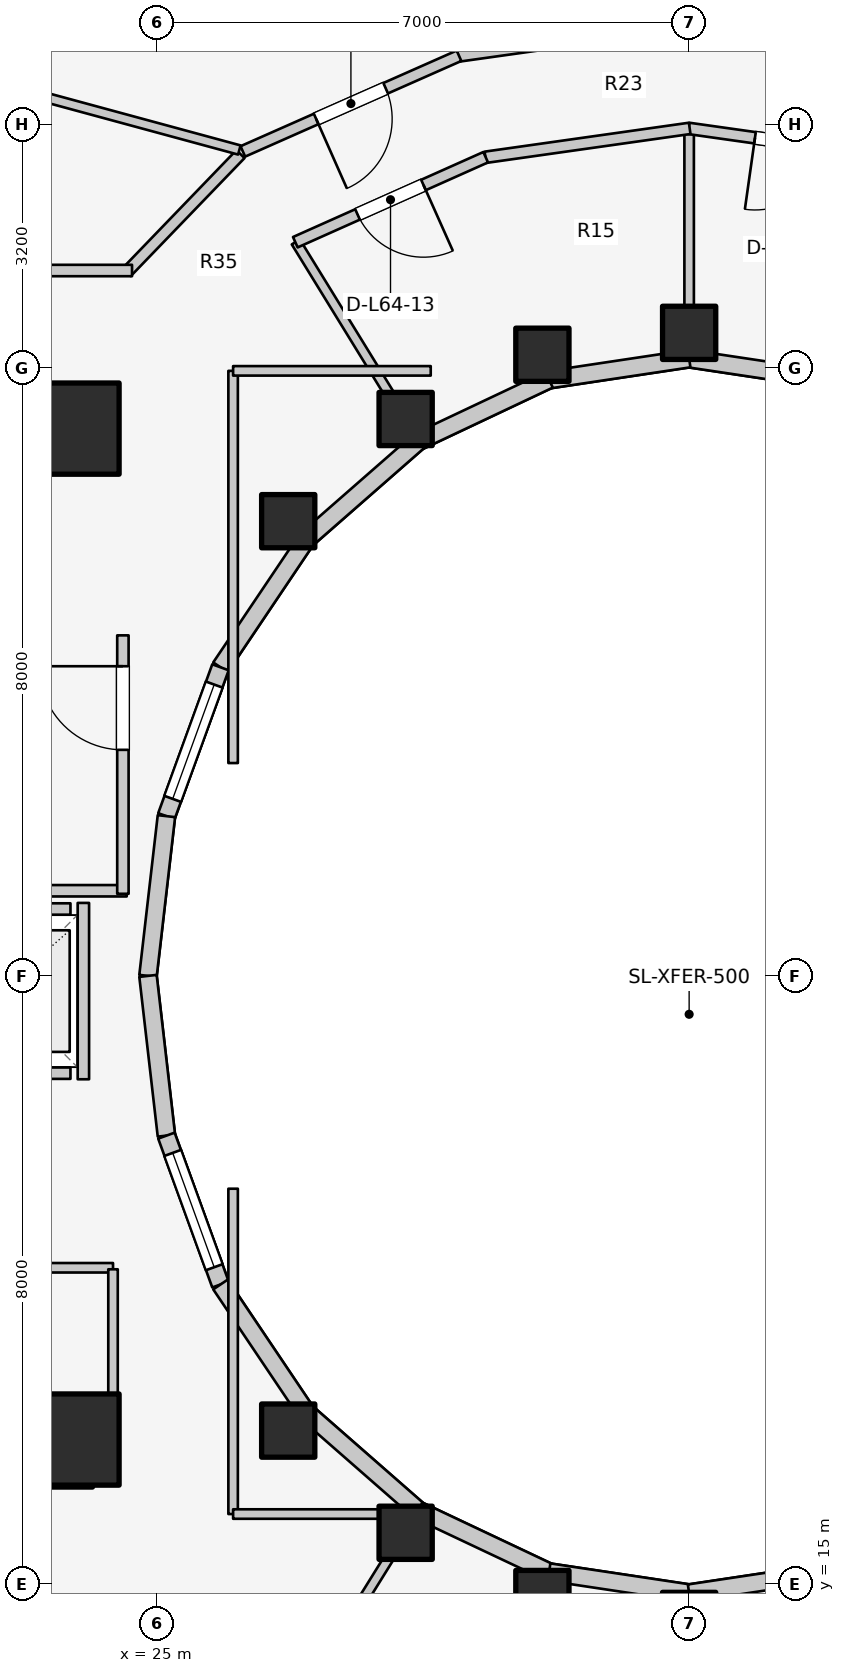
"""IFC4 building model, lengths in metres.
Left out: names, types, materials, properties, quantities, classifications, styles, units other than length and angle.
Written with IfcOpenShell. Run it as: python <this file> out.ifc"""

import sys

from ifc_helpers import new_model, si_unit, direction, frame, frame_2d, origin, origin_2d, place, context, subcontext, project, spatial, rectangle, extrude, element, fill, save


model = new_model("IFC4")
c1 = context("Model", 3, precision=1e-05, world=origin(), true_north=direction((0.0, 1.0)))
c2 = subcontext(c1, "Body", "Model", "MODEL_VIEW")
j1 = project(units=[si_unit("LENGTHUNIT", "METRE"), si_unit("PLANEANGLEUNIT", "RADIAN")], contexts=[c1])
p1 = place(None, origin())
s1 = spatial("IfcSite", under=j1, at=p1, CompositionType="ELEMENT")
p2 = place(p1, origin())
s2 = spatial("IfcBuilding", under=s1, at=p2, CompositionType="ELEMENT")
p3 = place(p2, frame((0.0, 0.0, 210.9)))
s3 = spatial("IfcBuildingStorey", under=s2, at=p3, CompositionType="ELEMENT", Elevation=210.9)
for number, where, z_axis, x_axis in (
    (1, (19.65, 16.55, 0.0), (0.0, 0.0, 1.0), (1.0, 0.0, 0.0)),
    (2, (19.65, 30.35, 0.0), (0.0, 0.0, 1.0), (1.0, 0.0, 0.0)),
):
    element("IfcWall", number, at=place(p3, frame(where, z_axis=z_axis, x_axis=x_axis)), inside=s3, PredefinedType="SHEAR", context=c2, shape_type="SweptSolid", body=[
        extrude(rectangle(XDim=4.5, YDim=0.55, at=frame_2d((2.25, 0.0))), origin(), (0.0, 0.0, 1.0), 3.1),
    ])
for number, where, z_axis, x_axis in (
    (3, (23.9, 16.9, 0.0), (0.0, 0.0, 1.0), (1.0, 0.0, 0.0)),
    (4, (23.9, 30.2, 0.0), (0.0, 0.0, 1.0), (1.0, 0.0, 0.0)),
):
    element("IfcColumn", number, at=place(p3, frame(where, z_axis=z_axis, x_axis=x_axis)), inside=s3, PredefinedType="COLUMN", context=c2, shape_type="SweptSolid", body=[
        extrude(rectangle(XDim=1.2, YDim=1.2, at=origin_2d()), origin(), (0.0, 0.0, 1.0), 3.1),
    ])
for number, where, z_axis, x_axis in (
    (5, (32.0, 31.46, 0.0), (0.0, 0.0, 1.0), (1.0, 0.0, 0.0)),
    (6, (30.069, 31.172, 0.0), (0.0, 0.0, 1.0), (1.0, 0.0, 0.0)),
    (7, (28.27, 30.327, 0.0), (0.0, 0.0, 1.0), (1.0, 0.0, 0.0)),
    (8, (26.725, 28.982, 0.0), (0.0, 0.0, 1.0), (1.0, 0.0, 0.0)),
    (9, (26.725, 17.018, 0.0), (0.0, 0.0, 1.0), (1.0, 0.0, 0.0)),
    (10, (28.27, 15.673, 0.0), (0.0, 0.0, 1.0), (1.0, 0.0, 0.0)),
    (11, (30.069, 14.828, 0.0), (0.0, 0.0, 1.0), (1.0, 0.0, 0.0)),
    (12, (32.0, 14.54, 0.0), (0.0, 0.0, 1.0), (1.0, 0.0, 0.0)),
):
    element("IfcColumn", number, at=place(p3, frame(where, z_axis=z_axis, x_axis=x_axis)), inside=s3, PredefinedType="COLUMN", context=c2, shape_type="SweptSolid", body=[
        extrude(rectangle(XDim=0.7, YDim=0.7, at=origin_2d()), origin(), (0.0, 0.0, 1.0), 3.1),
    ])
for number, where, z_axis, x_axis in (
    (13, (33.843, 30.843, 0.0), (0.0, 0.0, 1.0), (-0.989, 0.149, 0.0)),
    (14, (32.0, 31.12, 0.0), (0.0, 0.0, 1.0), (-0.989, -0.149, 0.0)),
):
    element("IfcWall", number, at=place(p3, frame(where, z_axis=z_axis, x_axis=x_axis)), inside=s3, PredefinedType="STANDARD", context=c2, shape_type="SweptSolid", body=[
        extrude(rectangle(XDim=1.864, YDim=0.23, at=frame_2d((0.932, 0.0))), origin(), (0.0, 0.0, 1.0), 2.16),
    ])
p4 = place(p3, frame((30.157, 30.843, 0.0), z_axis=(0.0, 0.0, 1.0), x_axis=(-0.904179699603, -0.427152280606, 0.0)))
e15 = element("IfcWall", 15, at=p4, inside=s3, PredefinedType="STANDARD", context=c2, shape_type="SweptSolid", body=[
    extrude(rectangle(XDim=1.899, YDim=0.23, at=frame_2d((0.95, 0.0))), origin(), (0.0, 0.0, 1.0), 2.16),
])
p5 = place(p3, frame((28.44, 30.032, 0.0), z_axis=(0.0, 0.0, 1.0), x_axis=(-0.752576694707, -0.658504607869, 0.0)))
e16 = element("IfcWall", 16, at=p5, inside=s3, PredefinedType="STANDARD", context=c2, shape_type="SweptSolid", body=[
    extrude(rectangle(XDim=1.959, YDim=0.23, at=frame_2d((0.98, 0.0))), origin(), (0.0, 0.0, 1.0), 2.16),
])
p6 = place(p3, frame((26.965, 28.742, 0.0), z_axis=(0.0, 0.0, 1.0), x_axis=(-0.558197800898, -0.829707909492, 0.0)))
e17 = element("IfcWall", 17, at=p6, inside=s3, PredefinedType="STANDARD", context=c2, shape_type="SweptSolid", body=[
    extrude(rectangle(XDim=2.027, YDim=0.23, at=frame_2d((1.013, 0.0))), origin(), (0.0, 0.0, 1.0), 2.16),
])
p7 = place(p3, frame((25.834, 27.06, 0.0), z_axis=(0.0, 0.0, 1.0), x_axis=(-0.341423187295, -0.93990968033, 0.0)))
e18 = element("IfcWall", 18, at=p7, inside=s3, PredefinedType="STANDARD", context=c2, shape_type="SweptSolid", body=[
    extrude(rectangle(XDim=2.084, YDim=0.23, at=frame_2d((1.042, 0.0))), origin(), (0.0, 0.0, 1.0), 2.84),
])
p8 = place(p7, frame((0.242, 0.0, 0.85)))
e19 = element("IfcOpeningElement", 19, at=p8, cuts=e18, PredefinedType="OPENING", context=c2, shape_type="SweptSolid", body=[
    extrude(rectangle(XDim=1.6, YDim=1.65, at=frame_2d((0.8, 0.825))), frame((0.0, 0.125, 0.0), z_axis=(0.0, -1.0, 0.0), x_axis=(1.0, 0.0, 0.0)), (0.0, 0.0, 1.0), 0.25),
])
for number, where, z_axis, x_axis in (
    (20, (25.123, 25.102, 0.0), (0.0, 0.0, 1.0), (-0.115, -0.993, 0.0)),
    (21, (24.88, 23.0, 0.0), (0.0, 0.0, 1.0), (0.115, -0.993, 0.0)),
):
    element("IfcWall", number, at=place(p3, frame(where, z_axis=z_axis, x_axis=x_axis)), inside=s3, PredefinedType="STANDARD", context=c2, shape_type="SweptSolid", body=[
        extrude(rectangle(XDim=2.115, YDim=0.23, at=frame_2d((1.058, 0.0))), origin(), (0.0, 0.0, 1.0), 2.84),
    ])
p9 = place(p3, frame((25.123, 20.898, 0.0), z_axis=(0.0, 0.0, 1.0), x_axis=(0.341423187295, -0.93990968033, 0.0)))
e22 = element("IfcWall", 22, at=p9, inside=s3, PredefinedType="STANDARD", context=c2, shape_type="SweptSolid", body=[
    extrude(rectangle(XDim=2.084, YDim=0.23, at=frame_2d((1.042, 0.0))), origin(), (0.0, 0.0, 1.0), 2.84),
])
p10 = place(p9, frame((0.242, 0.0, 0.85)))
e23 = element("IfcOpeningElement", 23, at=p10, cuts=e22, PredefinedType="OPENING", context=c2, shape_type="SweptSolid", body=[
    extrude(rectangle(XDim=1.6, YDim=1.65, at=frame_2d((0.8, 0.825))), frame((0.0, 0.125, 0.0), z_axis=(0.0, -1.0, 0.0), x_axis=(1.0, 0.0, 0.0)), (0.0, 0.0, 1.0), 0.25),
])
p11 = place(p3, frame((25.834, 18.94, 0.0), z_axis=(0.0, 0.0, 1.0), x_axis=(0.558197800898, -0.829707909492, 0.0)))
e24 = element("IfcWall", 24, at=p11, inside=s3, PredefinedType="STANDARD", context=c2, shape_type="SweptSolid", body=[
    extrude(rectangle(XDim=2.027, YDim=0.23, at=frame_2d((1.013, 0.0))), origin(), (0.0, 0.0, 1.0), 2.16),
])
p12 = place(p3, frame((26.965, 17.258, 0.0), z_axis=(0.0, 0.0, 1.0), x_axis=(0.752576694707, -0.658504607869, 0.0)))
e25 = element("IfcWall", 25, at=p12, inside=s3, PredefinedType="STANDARD", context=c2, shape_type="SweptSolid", body=[
    extrude(rectangle(XDim=1.959, YDim=0.23, at=frame_2d((0.98, 0.0))), origin(), (0.0, 0.0, 1.0), 2.16),
])
p13 = place(p3, frame((28.44, 15.968, 0.0), z_axis=(0.0, 0.0, 1.0), x_axis=(0.904179699603, -0.427152280606, 0.0)))
e26 = element("IfcWall", 26, at=p13, inside=s3, PredefinedType="STANDARD", context=c2, shape_type="SweptSolid", body=[
    extrude(rectangle(XDim=1.899, YDim=0.23, at=frame_2d((0.95, 0.0))), origin(), (0.0, 0.0, 1.0), 2.16),
])
for number, where, z_axis, x_axis in (
    (27, (30.157, 15.157, 0.0), (0.0, 0.0, 1.0), (0.989, -0.149, 0.0)),
    (28, (32.0, 14.88, 0.0), (0.0, 0.0, 1.0), (0.989, 0.149, 0.0)),
):
    element("IfcWall", number, at=place(p3, frame(where, z_axis=z_axis, x_axis=x_axis)), inside=s3, PredefinedType="STANDARD", context=c2, shape_type="SweptSolid", body=[
        extrude(rectangle(XDim=1.864, YDim=0.23, at=frame_2d((0.932, 0.0))), origin(), (0.0, 0.0, 1.0), 2.16),
    ])
p14 = place(p3, frame((22.04, 21.72, 0.0), z_axis=(0.0, 0.0, 1.0), x_axis=(1.0, 0.0, 0.0)))
e29 = element("IfcWall", 29, at=p14, inside=s3, PredefinedType="SOLIDWALL", context=c2, shape_type="SweptSolid", body=[
    extrude(rectangle(XDim=1.82, YDim=0.15, at=frame_2d((0.91, 0.0))), origin(), (0.0, 0.0, 1.0), 2.12),
])
p15 = place(p14, frame((0.36, 0.0, 0.0)))
e30 = element("IfcOpeningElement", 30, at=p15, cuts=e29, PredefinedType="OPENING", context=c2, shape_type="SweptSolid", body=[
    extrude(rectangle(XDim=1.1, YDim=2.1, at=frame_2d((0.55, 1.05))), frame((0.0, 0.085, 0.0), z_axis=(0.0, -1.0, 0.0), x_axis=(1.0, 0.0, 0.0)), (0.0, 0.0, 1.0), 0.17),
])
p16 = place(p3, frame((22.04, 23.88, 0.0), z_axis=(0.0, 0.0, 1.0), x_axis=(1.0, 0.0, 0.0)))
e31 = element("IfcWall", 31, at=p16, inside=s3, PredefinedType="SOLIDWALL", context=c2, shape_type="SweptSolid", body=[
    extrude(rectangle(XDim=1.82, YDim=0.15, at=frame_2d((0.91, 0.0))), origin(), (0.0, 0.0, 1.0), 2.12),
])
p17 = place(p3, frame((24.03, 21.64, 0.0), z_axis=(0.0, 0.0, 1.0), x_axis=(0.0, 1.0, 0.0)))
e32 = element("IfcWall", 32, at=p17, inside=s3, PredefinedType="SOLIDWALL", context=c2, shape_type="SweptSolid", body=[
    extrude(rectangle(XDim=2.32, YDim=0.15, at=frame_2d((1.16, 0.0))), origin(), (0.0, 0.0, 1.0), 2.12),
])
p18 = place(p3, frame((19.52, 24.12, 0.0), z_axis=(0.0, 0.0, 1.0), x_axis=(1.0, 0.0, 0.0)))
e33 = element("IfcWall", 33, at=p18, inside=s3, PredefinedType="PARTITIONING", context=c2, shape_type="SweptSolid", body=[
    extrude(rectangle(XDim=5.08, YDim=0.15, at=frame_2d((2.54, 0.0))), origin(), (0.0, 0.0, 1.0), 2.12),
])
p19 = place(p3, frame((24.55, 24.08, 0.0), z_axis=(0.0, 0.0, 1.0), x_axis=(0.0, 1.0, 0.0)))
e34 = element("IfcWall", 34, at=p19, inside=s3, PredefinedType="PARTITIONING", context=c2, shape_type="SweptSolid", body=[
    extrude(rectangle(XDim=3.4, YDim=0.15, at=frame_2d((1.7, 0.0))), origin(), (0.0, 0.0, 1.0), 2.855),
])
p20 = place(p19, frame((1.894, 0.0, 0.0)))
e35 = element("IfcOpeningElement", 35, at=p20, cuts=e34, PredefinedType="OPENING", context=c2, shape_type="SweptSolid", body=[
    extrude(rectangle(XDim=1.1, YDim=2.1, at=frame_2d((0.55, 1.05))), frame((0.0, 0.085, 0.0), z_axis=(0.0, -1.0, 0.0), x_axis=(1.0, 0.0, 0.0)), (0.0, 0.0, 1.0), 0.17),
])
p21 = place(p3, frame((19.55, 19.16, 0.0), z_axis=(0.0, 0.0, 1.0), x_axis=(1.0, 0.0, 0.0)))
e36 = element("IfcWall", 36, at=p21, inside=s3, PredefinedType="PARTITIONING", context=c2, shape_type="SweptSolid", body=[
    extrude(rectangle(XDim=4.87, YDim=0.125, at=frame_2d((2.435, 0.0))), origin(), (0.0, 0.0, 1.0), 2.12),
])
p22 = place(p21, frame((2.272, 0.0, 0.0)))
e37 = element("IfcOpeningElement", 37, at=p22, cuts=e36, PredefinedType="OPENING", context=c2, shape_type="SweptSolid", body=[
    extrude(rectangle(XDim=0.85, YDim=2.05, at=frame_2d((0.425, 1.025))), frame((0.0, 0.073, 0.0), z_axis=(0.0, -1.0, 0.0), x_axis=(1.0, 0.0, 0.0)), (0.0, 0.0, 1.0), 0.145),
])
p23 = place(p3, frame((24.42, 17.1, 0.0), z_axis=(0.0, 0.0, 1.0), x_axis=(0.0, 1.0, 0.0)))
e38 = element("IfcWall", 38, at=p23, inside=s3, PredefinedType="PARTITIONING", context=c2, shape_type="SweptSolid", body=[
    extrude(rectangle(XDim=2.04, YDim=0.125, at=frame_2d((1.02, 0.0))), origin(), (0.0, 0.0, 1.0), 2.232),
])
p24 = place(p3, frame((32.0, 31.1, 0.0), z_axis=(0.0, 0.0, 1.0), x_axis=(0.0, 1.0, 0.0)))
e39 = element("IfcWall", 39, at=p24, inside=s3, PredefinedType="PARTITIONING", context=c2, shape_type="SweptSolid", body=[
    extrude(rectangle(XDim=3.05, YDim=0.125, at=frame_2d((1.525, 0.0))), origin(), (0.0, 0.0, 1.0), 2.376),
])
p25 = place(p3, frame((28.45, 30.015, 0.0), z_axis=(0.0, 0.0, 1.0), x_axis=(-0.523992004803, 0.851723182086, 0.0)))
e40 = element("IfcWall", 40, at=p25, inside=s3, PredefinedType="PARTITIONING", context=c2, shape_type="SweptSolid", body=[
    extrude(rectangle(XDim=3.101, YDim=0.125, at=frame_2d((1.551, 0.0))), origin(), (0.0, 0.0, 1.0), 2.376),
])
p26 = place(p3, frame((34.68, 33.77, 0.0), z_axis=(0.0, 0.0, 1.0), x_axis=(-0.990132151456, 0.140136799779, 0.0)))
e41 = element("IfcWall", 41, at=p26, inside=s3, PredefinedType="PARTITIONING", context=c2, shape_type="SweptSolid", body=[
    extrude(rectangle(XDim=2.714, YDim=0.15, at=frame_2d((1.357, 0.0))), origin(), (0.0, 0.0, 1.0), 2.376),
])
p27 = place(p26, frame((0.882, 0.0, 0.0)))
e42 = element("IfcOpeningElement", 42, at=p27, cuts=e41, PredefinedType="OPENING", context=c2, shape_type="SweptSolid", body=[
    extrude(rectangle(XDim=0.95, YDim=2.1, at=frame_2d((0.475, 1.05))), frame((0.0, 0.085, 0.0), z_axis=(0.0, -1.0, 0.0), x_axis=(1.0, 0.0, 0.0)), (0.0, 0.0, 1.0), 0.17),
])
p28 = place(p3, frame((32.007, 34.15, 0.0), z_axis=(0.0, 0.0, 1.0), x_axis=(-0.990132151456, -0.140136799779, 0.0)))
e43 = element("IfcWall", 43, at=p28, inside=s3, PredefinedType="PARTITIONING", context=c2, shape_type="SweptSolid", body=[
    extrude(rectangle(XDim=2.714, YDim=0.15, at=frame_2d((1.357, 0.0))), origin(), (0.0, 0.0, 1.0), 2.376),
])
p29 = place(p3, frame((29.323, 33.771, 0.0), z_axis=(0.0, 0.0, 1.0), x_axis=(-0.913120130558, -0.407690602257, 0.0)))
e44 = element("IfcWall", 44, at=p29, inside=s3, PredefinedType="PARTITIONING", context=c2, shape_type="SweptSolid", body=[
    extrude(rectangle(XDim=2.743, YDim=0.15, at=frame_2d((1.371, 0.0))), origin(), (0.0, 0.0, 1.0), 2.376),
])
p30 = place(p29, frame((0.896, 0.0, 0.0)))
e45 = element("IfcOpeningElement", 45, at=p30, cuts=e44, PredefinedType="OPENING", context=c2, shape_type="SweptSolid", body=[
    extrude(rectangle(XDim=0.95, YDim=2.1, at=frame_2d((0.475, 1.05))), frame((0.0, 0.085, 0.0), z_axis=(0.0, -1.0, 0.0), x_axis=(1.0, 0.0, 0.0)), (0.0, 0.0, 1.0), 0.17),
])
p31 = place(p3, frame((28.45, 15.985, 0.0), z_axis=(0.0, 0.0, 1.0), x_axis=(-0.527527080983, -0.849538215049, 0.0)))
e46 = element("IfcWall", 46, at=p31, inside=s3, PredefinedType="PARTITIONING", context=c2, shape_type="SweptSolid", body=[
    extrude(rectangle(XDim=2.701, YDim=0.125, at=frame_2d((1.351, 0.0))), origin(), (0.0, 0.0, 1.0), 2.376),
])
p32 = place(p3, frame((32.0, 14.9, 0.0), z_axis=(0.0, 0.0, 1.0), x_axis=(0.0, -1.0, 0.0)))
e47 = element("IfcWall", 47, at=p32, inside=s3, PredefinedType="PARTITIONING", context=c2, shape_type="SweptSolid", body=[
    extrude(rectangle(XDim=2.65, YDim=0.125, at=frame_2d((1.325, 0.0))), origin(), (0.0, 0.0, 1.0), 2.376),
])
p33 = place(p3, frame((26.0, 25.8, 0.0), z_axis=(0.0, 0.0, 1.0), x_axis=(0.0, 1.0, 0.0)))
e48 = element("IfcWall", 48, at=p33, inside=s3, PredefinedType="PARTITIONING", context=c2, shape_type="SweptSolid", body=[
    extrude(rectangle(XDim=5.16, YDim=0.125, at=frame_2d((2.58, 0.0))), origin(), (0.0, 0.0, 1.0), 2.232),
])
p34 = place(p3, frame((26.0, 30.96, 0.0), z_axis=(0.0, 0.0, 1.0), x_axis=(1.0, 0.0, 0.0)))
e49 = element("IfcWall", 49, at=p34, inside=s3, PredefinedType="PARTITIONING", context=c2, shape_type="SweptSolid", body=[
    extrude(rectangle(XDim=2.6, YDim=0.125, at=frame_2d((1.3, 0.0))), origin(), (0.0, 0.0, 1.0), 2.376),
])
p35 = place(p3, frame((26.0, 15.92, 0.0), z_axis=(0.0, 0.0, 1.0), x_axis=(0.0, 1.0, 0.0)))
e50 = element("IfcWall", 50, at=p35, inside=s3, PredefinedType="PARTITIONING", context=c2, shape_type="SweptSolid", body=[
    extrude(rectangle(XDim=4.28, YDim=0.125, at=frame_2d((2.14, 0.0))), origin(), (0.0, 0.0, 1.0), 2.232),
])
p36 = place(p3, frame((26.0, 15.92, 0.0), z_axis=(0.0, 0.0, 1.0), x_axis=(1.0, 0.0, 0.0)))
e51 = element("IfcWall", 51, at=p36, inside=s3, PredefinedType="PARTITIONING", context=c2, shape_type="SweptSolid", body=[
    extrude(rectangle(XDim=2.6, YDim=0.125, at=frame_2d((1.3, 0.0))), origin(), (0.0, 0.0, 1.0), 2.232),
])
p37 = place(p3, frame((26.097, 33.812, 0.0), z_axis=(0.0, 0.0, 1.0), x_axis=(-0.694032962553, -0.719943224768, 0.0)))
e52 = element("IfcWall", 52, at=p37, inside=s3, PredefinedType="PARTITIONING", context=c2, shape_type="SweptSolid", body=[
    extrude(rectangle(XDim=2.158, YDim=0.15, at=frame_2d((1.079, 0.0))), origin(), (0.0, 0.0, 1.0), 2.376),
])
p38 = place(p3, frame((17.15, 32.28, 0.0), z_axis=(0.0, 0.0, 1.0), x_axis=(1.0, 0.0, 0.0)))
e53 = element("IfcWall", 53, at=p38, inside=s3, PredefinedType="PARTITIONING", context=c2, shape_type="SweptSolid", body=[
    extrude(rectangle(XDim=7.52, YDim=0.15, at=frame_2d((3.76, 0.0))), origin(), (0.0, 0.0, 1.0), 2.376),
])
p39 = place(p38, frame((1.3, 0.0, 0.0)))
e54 = element("IfcOpeningElement", 54, at=p39, cuts=e53, PredefinedType="OPENING", context=c2, shape_type="SweptSolid", body=[
    extrude(rectangle(XDim=0.9, YDim=2.1, at=frame_2d((0.45, 1.05))), frame((0.0, 0.085, 0.0), z_axis=(0.0, -1.0, 0.0), x_axis=(1.0, 0.0, 0.0)), (0.0, 0.0, 1.0), 0.17),
])
p40 = place(p3, frame((26.082, 33.866, 0.0), z_axis=(0.0, 0.0, 1.0), x_axis=(-0.965109390289, 0.261847025523, 0.0)))
e55 = element("IfcWall", 55, at=p40, inside=s3, PredefinedType="PARTITIONING", context=c2, shape_type="SweptSolid", body=[
    extrude(rectangle(XDim=5.644, YDim=0.125, at=frame_2d((2.822, 0.0))), origin(), (0.0, 0.0, 1.0), 2.376),
])
p41 = place(p3, frame((35.044, 35.101, 0.0), z_axis=(0.0, 0.0, 1.0), x_axis=(-0.990257602807, 0.139247549651, 0.0)))
e56 = element("IfcWall", 56, at=p41, inside=s3, PredefinedType="PARTITIONING", context=c2, shape_type="SweptSolid", body=[
    extrude(rectangle(XDim=3.082, YDim=0.15, at=frame_2d((1.541, 0.0))), origin(), (0.0, 0.0, 1.0), 2.376),
])
p42 = place(p41, frame((1.041, 0.0, 0.0)))
e57 = element("IfcOpeningElement", 57, at=p42, cuts=e56, PredefinedType="OPENING", context=c2, shape_type="SweptSolid", body=[
    extrude(rectangle(XDim=1.0, YDim=2.1, at=frame_2d((0.5, 1.05))), frame((0.0, 0.085, 0.0), z_axis=(0.0, -1.0, 0.0), x_axis=(1.0, 0.0, 0.0)), (0.0, 0.0, 1.0), 0.17),
])
p43 = place(p3, frame((32.008, 35.53, 0.0), z_axis=(0.0, 0.0, 1.0), x_axis=(-0.990257602807, -0.139247549651, 0.0)))
e58 = element("IfcWall", 58, at=p43, inside=s3, PredefinedType="PARTITIONING", context=c2, shape_type="SweptSolid", body=[
    extrude(rectangle(XDim=3.082, YDim=0.15, at=frame_2d((1.541, 0.0))), origin(), (0.0, 0.0, 1.0), 2.376),
])
p44 = place(p3, frame((28.972, 35.105, 0.0), z_axis=(0.0, 0.0, 1.0), x_axis=(-0.914490094652, -0.40460828808, 0.0)))
e59 = element("IfcWall", 59, at=p44, inside=s3, PredefinedType="PARTITIONING", context=c2, shape_type="SweptSolid", body=[
    extrude(rectangle(XDim=3.11, YDim=0.15, at=frame_2d((1.555, 0.0))), origin(), (0.0, 0.0, 1.0), 2.376),
])
p45 = place(p44, frame((1.055, 0.0, 0.0)))
e60 = element("IfcOpeningElement", 60, at=p45, cuts=e59, PredefinedType="OPENING", context=c2, shape_type="SweptSolid", body=[
    extrude(rectangle(XDim=1.0, YDim=2.1, at=frame_2d((0.5, 1.05))), frame((0.0, 0.085, 0.0), z_axis=(0.0, -1.0, 0.0), x_axis=(1.0, 0.0, 0.0)), (0.0, 0.0, 1.0), 0.17),
])
p46 = place(p8, origin())
e61 = element("IfcWindow", 61, at=p46, inside=s3, PartitioningType="SINGLE_PANEL", PredefinedType="WINDOW", context=c2, shape_type="SweptSolid", body=[
    extrude(rectangle(XDim=1.6, YDim=1.65, at=frame_2d((0.8, 0.825))), frame((0.0, 0.03, 0.0), z_axis=(0.0, -1.0, 0.0), x_axis=(1.0, 0.0, 0.0)), (0.0, 0.0, 1.0), 0.06),
])
fill(e19, e61)
p47 = place(p10, origin())
e62 = element("IfcWindow", 62, at=p47, inside=s3, PartitioningType="SINGLE_PANEL", PredefinedType="WINDOW", context=c2, shape_type="SweptSolid", body=[
    extrude(rectangle(XDim=1.6, YDim=1.65, at=frame_2d((0.8, 0.825))), frame((0.0, 0.03, 0.0), z_axis=(0.0, -1.0, 0.0), x_axis=(1.0, 0.0, 0.0)), (0.0, 0.0, 1.0), 0.06),
])
fill(e23, e62)
p48 = place(p20, origin())
e63 = element("IfcDoor", 63, at=p48, inside=s3, OperationType="SINGLE_SWING_RIGHT", PredefinedType="DOOR", context=c2, shape_type="SweptSolid", body=[
    extrude(rectangle(XDim=1.1, YDim=2.1, at=frame_2d((0.55, 1.05))), frame((0.0, 0.025, 0.0), z_axis=(0.0, -1.0, 0.0), x_axis=(1.0, 0.0, 0.0)), (0.0, 0.0, 1.0), 0.05),
])
fill(e35, e63)
p49 = place(p27, origin())
e64 = element("IfcDoor", 64, at=p49, inside=s3, OperationType="SINGLE_SWING_RIGHT", PredefinedType="DOOR", context=c2, shape_type="SweptSolid", body=[
    extrude(rectangle(XDim=0.95, YDim=2.1, at=frame_2d((0.475, 1.05))), frame((0.0, 0.025, 0.0), z_axis=(0.0, -1.0, 0.0), x_axis=(1.0, 0.0, 0.0)), (0.0, 0.0, 1.0), 0.05),
])
fill(e42, e64)
p50 = place(p30, origin())
e65 = element("IfcDoor", 65, at=p50, inside=s3, OperationType="SINGLE_SWING_LEFT", PredefinedType="DOOR", context=c2, shape_type="SweptSolid", body=[
    extrude(rectangle(XDim=0.95, YDim=2.1, at=frame_2d((0.475, 1.05))), frame((0.0, 0.025, 0.0), z_axis=(0.0, -1.0, 0.0), x_axis=(1.0, 0.0, 0.0)), (0.0, 0.0, 1.0), 0.05),
])
fill(e45, e65)
p51 = place(p45, origin())
e66 = element("IfcDoor", 66, at=p51, inside=s3, OperationType="SINGLE_SWING_RIGHT", PredefinedType="DOOR", context=c2, shape_type="SweptSolid", body=[
    extrude(rectangle(XDim=1.0, YDim=2.1, at=frame_2d((0.5, 1.05))), frame((0.0, 0.025, 0.0), z_axis=(0.0, -1.0, 0.0), x_axis=(1.0, 0.0, 0.0)), (0.0, 0.0, 1.0), 0.05),
])
fill(e60, e66)
save(model, sys.argv[1])
